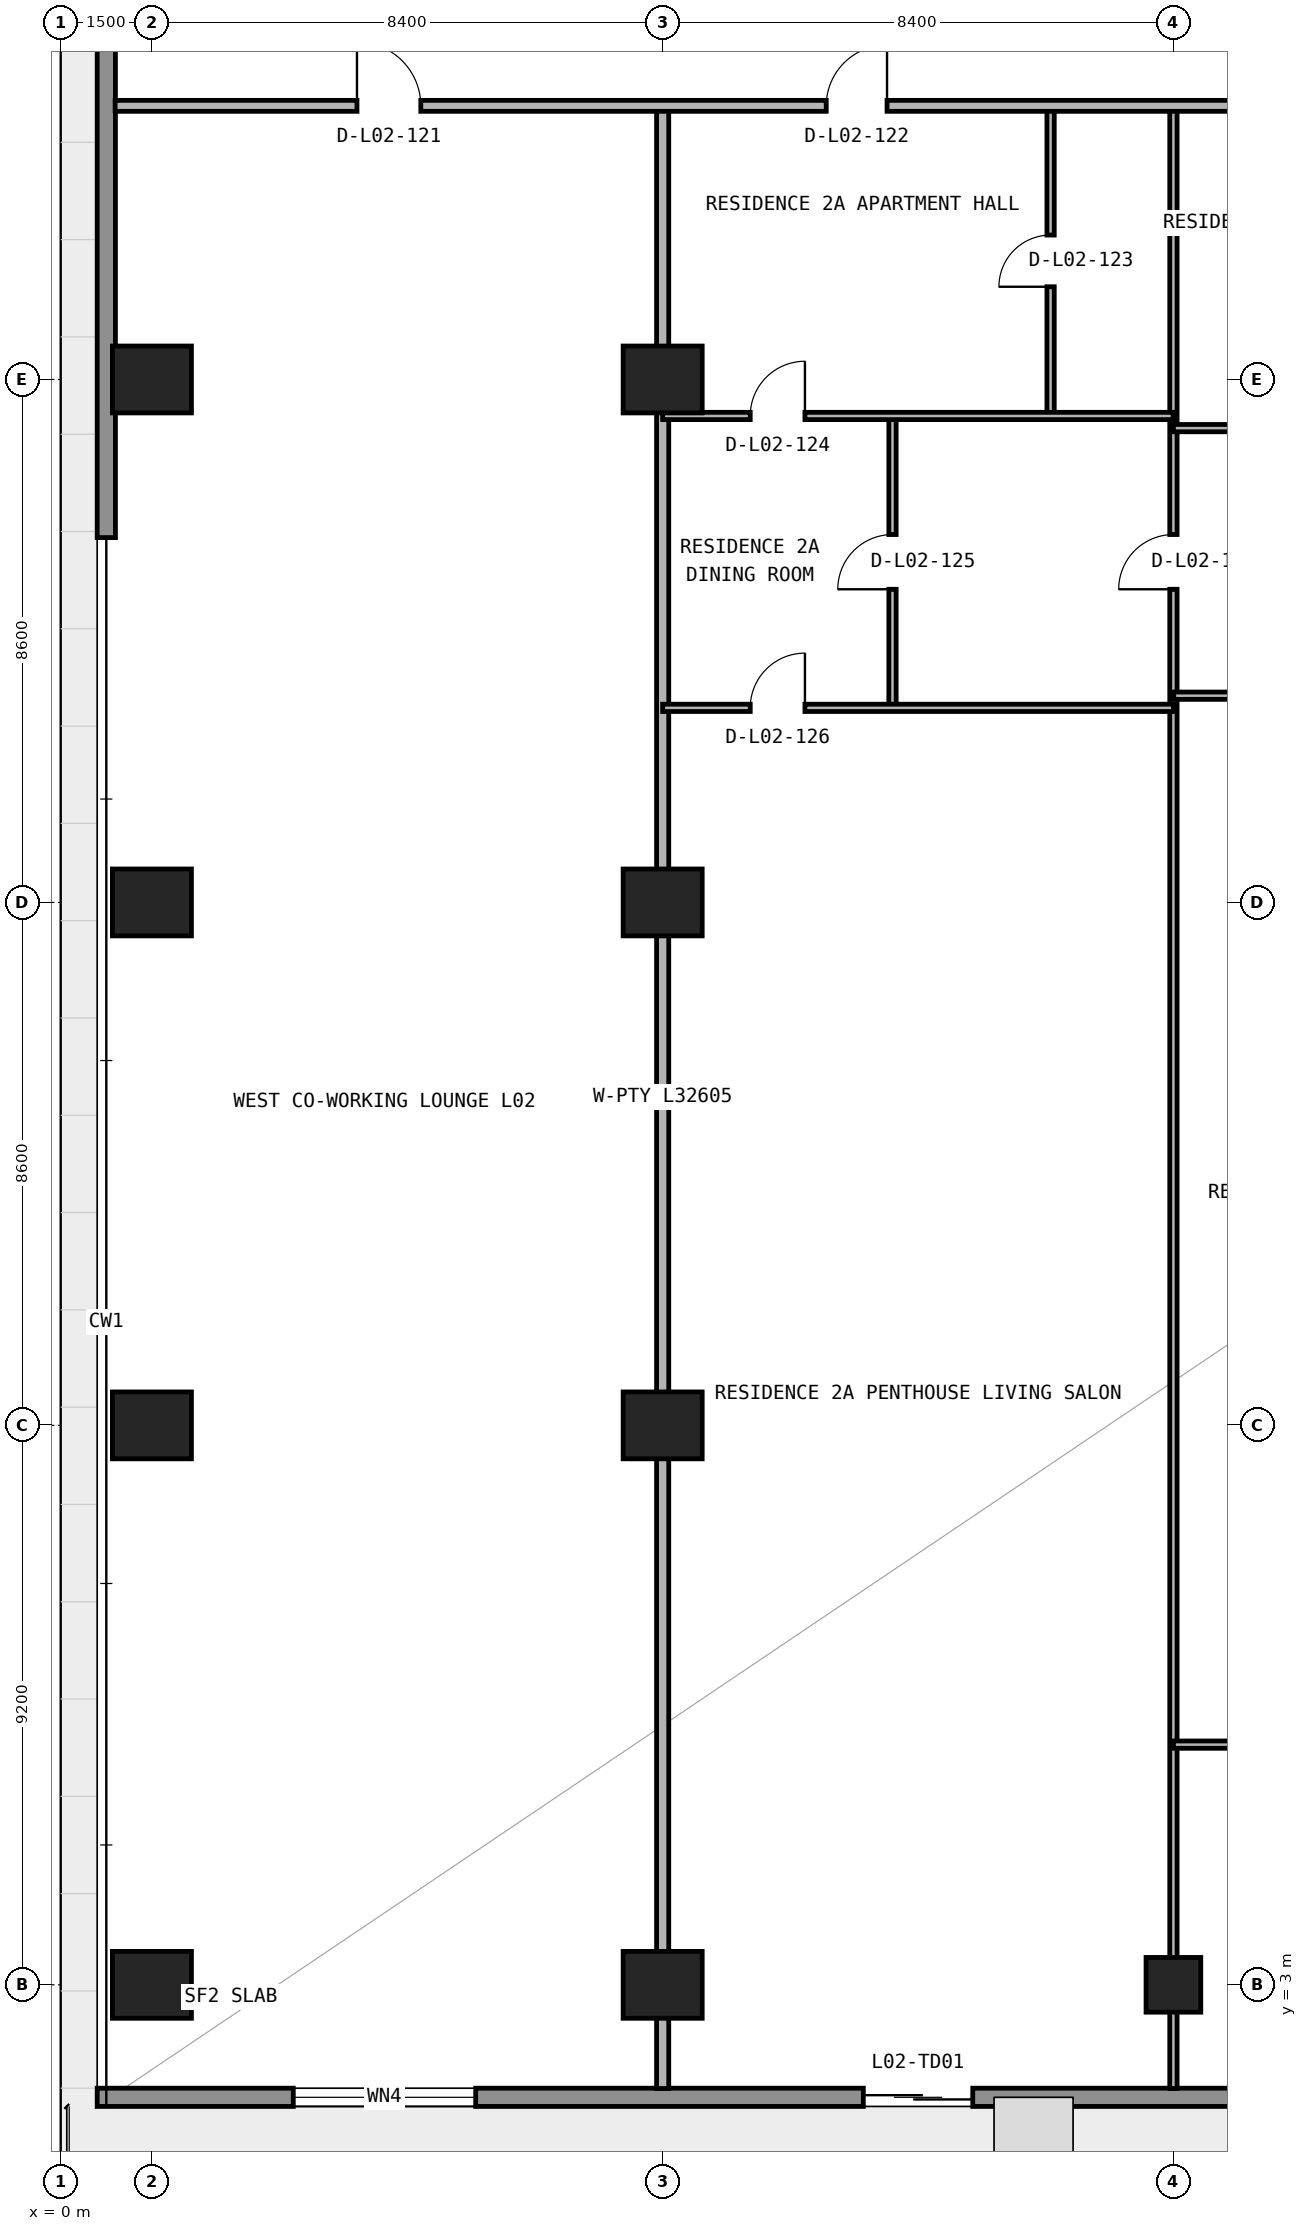
"""IFC4 building model, lengths in metres.
Left out: names, types, materials, properties, quantities, classifications, styles, units other than length and angle.
Written with IfcOpenShell. Run it as: python <this file> out.ifc"""

import sys

from ifc_helpers import new_model, si_unit, direction, frame, frame_2d, origin, origin_2d, place, context, subcontext, project, spatial, rectangle, circle, extrude, element, fill, save


model = new_model("IFC4")
c1 = context("Model", 3, precision=1e-05, world=origin(), true_north=direction((0.0, 1.0)))
c2 = subcontext(c1, "Body", "Model", "MODEL_VIEW")
j1 = project(units=[si_unit("LENGTHUNIT", "METRE"), si_unit("PLANEANGLEUNIT", "RADIAN")], contexts=[c1])
p1 = place(None, origin())
s1 = spatial("IfcSite", under=j1, at=p1, CompositionType="ELEMENT")
p2 = place(p1, origin())
s2 = spatial("IfcBuilding", under=s1, at=p2, CompositionType="ELEMENT")
p3 = place(p2, frame((0.0, 0.0, 10.2)))
s3 = spatial("IfcBuildingStorey", under=s2, at=p3, CompositionType="ELEMENT", Elevation=10.2)
for number, where, z_axis, x_axis in (
    (1, (1.5, 3.0, 0.0), (0.0, 0.0, 1.0), (1.0, 0.0, 0.0)),
    (2, (9.9, 3.0, 0.0), (0.0, 0.0, 1.0), (1.0, 0.0, 0.0)),
):
    element("IfcColumn", number, at=place(p3, frame(where, z_axis=z_axis, x_axis=x_axis)), inside=s3, PredefinedType="COLUMN", context=c2, shape_type="SweptSolid", body=[
        extrude(rectangle(XDim=1.3, YDim=1.1, at=origin_2d()), origin(), (0.0, 0.0, 1.0), 4.5),
    ])
p4 = place(p3, frame((18.3, 3.0, 0.0), z_axis=(0.0, 0.0, 1.0), x_axis=(1.0, 0.0, 0.0)))
e3 = element("IfcColumn", 3, at=p4, inside=s3, PredefinedType="COLUMN", context=c2, shape_type="SweptSolid", body=[
    extrude(circle(Radius=0.45, at=origin_2d()), origin(), (0.0, 0.0, 1.0), 4.5),
])
for number, where, z_axis, x_axis in (
    (4, (1.5, 12.2, 0.0), (0.0, 0.0, 1.0), (1.0, 0.0, 0.0)),
    (5, (9.9, 12.2, 0.0), (0.0, 0.0, 1.0), (1.0, 0.0, 0.0)),
    (6, (1.5, 20.8, 0.0), (0.0, 0.0, 1.0), (1.0, 0.0, 0.0)),
    (7, (9.9, 20.8, 0.0), (0.0, 0.0, 1.0), (1.0, 0.0, 0.0)),
    (8, (1.5, 29.4, 0.0), (0.0, 0.0, 1.0), (1.0, 0.0, 0.0)),
    (9, (9.9, 29.4, 0.0), (0.0, 0.0, 1.0), (1.0, 0.0, 0.0)),
):
    element("IfcColumn", number, at=place(p3, frame(where, z_axis=z_axis, x_axis=x_axis)), inside=s3, PredefinedType="COLUMN", context=c2, shape_type="SweptSolid", body=[
        extrude(rectangle(XDim=1.3, YDim=1.1, at=origin_2d()), origin(), (0.0, 0.0, 1.0), 4.5),
    ])
p5 = place(p3, frame((77.2, 1.15, 0.0), z_axis=(0.0, 0.0, 1.0), x_axis=(-1.0, 0.0, 0.0)))
e10 = element("IfcWall", 10, at=p5, inside=s3, PredefinedType="STANDARD", context=c2, shape_type="SweptSolid", body=[
    extrude(rectangle(XDim=76.6, YDim=0.3, at=frame_2d((38.3, 0.0))), origin(), (0.0, 0.0, 1.0), 4.5),
])
p6 = place(p5, frame((70.375, 0.0, 0.85)))
e11 = element("IfcOpeningElement", 11, at=p6, cuts=e10, PredefinedType="OPENING", context=c2, shape_type="SweptSolid", body=[
    extrude(rectangle(XDim=3.0, YDim=2.4, at=frame_2d((1.5, 1.2))), frame((0.0, 0.16, 0.0), z_axis=(0.0, -1.0, 0.0), x_axis=(1.0, 0.0, 0.0)), (0.0, 0.0, 1.0), 0.32),
])
p7 = place(p5, frame((62.2, 0.0, 0.0)))
e12 = element("IfcOpeningElement", 12, at=p7, cuts=e10, PredefinedType="OPENING", context=c2, shape_type="SweptSolid", body=[
    extrude(rectangle(XDim=1.8, YDim=2.3, at=frame_2d((0.9, 1.15))), frame((0.0, 0.16, 0.0), z_axis=(0.0, -1.0, 0.0), x_axis=(1.0, 0.0, 0.0)), (0.0, 0.0, 1.0), 0.32),
])
p8 = place(p5, frame((53.6, 0.0, 0.85)))
e13 = element("IfcOpeningElement", 13, at=p8, cuts=e10, PredefinedType="OPENING", context=c2, shape_type="SweptSolid", body=[
    extrude(rectangle(XDim=2.2, YDim=1.55, at=frame_2d((1.1, 0.775))), frame((0.0, 0.16, 0.0), z_axis=(0.0, -1.0, 0.0), x_axis=(1.0, 0.0, 0.0)), (0.0, 0.0, 1.0), 0.32),
])
p9 = place(p5, frame((37.4, 0.0, 0.0)))
e14 = element("IfcOpeningElement", 14, at=p9, cuts=e10, PredefinedType="OPENING", context=c2, shape_type="SweptSolid", body=[
    extrude(rectangle(XDim=1.8, YDim=2.3, at=frame_2d((0.9, 1.15))), frame((0.0, 0.16, 0.0), z_axis=(0.0, -1.0, 0.0), x_axis=(1.0, 0.0, 0.0)), (0.0, 0.0, 1.0), 0.32),
])
p10 = place(p5, frame((21.0, 0.0, 0.0)))
e15 = element("IfcOpeningElement", 15, at=p10, cuts=e10, PredefinedType="OPENING", context=c2, shape_type="SweptSolid", body=[
    extrude(rectangle(XDim=1.8, YDim=2.3, at=frame_2d((0.9, 1.15))), frame((0.0, 0.16, 0.0), z_axis=(0.0, -1.0, 0.0), x_axis=(1.0, 0.0, 0.0)), (0.0, 0.0, 1.0), 0.32),
])
p11 = place(p5, frame((12.4, 0.0, 0.85)))
e16 = element("IfcOpeningElement", 16, at=p11, cuts=e10, PredefinedType="OPENING", context=c2, shape_type="SweptSolid", body=[
    extrude(rectangle(XDim=2.2, YDim=1.55, at=frame_2d((1.1, 0.775))), frame((0.0, 0.16, 0.0), z_axis=(0.0, -1.0, 0.0), x_axis=(1.0, 0.0, 0.0)), (0.0, 0.0, 1.0), 0.32),
])
p12 = place(p5, frame((3.825, 0.0, 0.0)))
e17 = element("IfcOpeningElement", 17, at=p12, cuts=e10, PredefinedType="OPENING", context=c2, shape_type="SweptSolid", body=[
    extrude(rectangle(XDim=1.8, YDim=2.3, at=frame_2d((0.9, 1.15))), frame((0.0, 0.16, 0.0), z_axis=(0.0, -1.0, 0.0), x_axis=(1.0, 0.0, 0.0)), (0.0, 0.0, 1.0), 0.32),
])
p13 = place(p3, frame((0.75, 26.8, 0.0), z_axis=(0.0, 0.0, 1.0), x_axis=(0.0, 1.0, 0.0)))
e18 = element("IfcWall", 18, at=p13, inside=s3, PredefinedType="STANDARD", context=c2, shape_type="SweptSolid", body=[
    extrude(rectangle(XDim=25.8, YDim=0.3, at=frame_2d((12.9, 0.0))), origin(), (0.0, 0.0, 1.0), 4.5),
])
p14 = place(p3, frame((9.9, 1.295, 0.0), z_axis=(0.0, 0.0, 1.0), x_axis=(0.0, 1.0, 0.0)))
e19 = element("IfcWall", 19, at=p14, inside=s3, PredefinedType="PARTITIONING", context=c2, shape_type="SweptSolid", body=[
    extrude(rectangle(XDim=32.605, YDim=0.2, at=frame_2d((16.302, 0.0))), origin(), (0.0, 0.0, 1.0), 3.464),
])
p15 = place(p3, frame((13.68, 24.0, 0.0), z_axis=(0.0, 0.0, 1.0), x_axis=(0.0, 1.0, 0.0)))
e20 = element("IfcWall", 20, at=p15, inside=s3, PredefinedType="PARTITIONING", context=c2, shape_type="SweptSolid", body=[
    extrude(rectangle(XDim=4.8, YDim=0.12, at=frame_2d((2.4, 0.0))), origin(), (0.0, 0.0, 1.0), 4.5),
])
p16 = place(p15, frame((1.95, 0.0, 0.0)))
e21 = element("IfcOpeningElement", 21, at=p16, cuts=e20, PredefinedType="OPENING", context=c2, shape_type="SweptSolid", body=[
    extrude(rectangle(XDim=0.9, YDim=2.15, at=frame_2d((0.45, 1.075))), frame((0.0, 0.07, 0.0), z_axis=(0.0, -1.0, 0.0), x_axis=(1.0, 0.0, 0.0)), (0.0, 0.0, 1.0), 0.14),
])
p17 = place(p3, frame((16.28, 28.8, 0.0), z_axis=(0.0, 0.0, 1.0), x_axis=(0.0, 1.0, 0.0)))
e22 = element("IfcWall", 22, at=p17, inside=s3, PredefinedType="PARTITIONING", context=c2, shape_type="SweptSolid", body=[
    extrude(rectangle(XDim=5.1, YDim=0.12, at=frame_2d((2.55, 0.0))), origin(), (0.0, 0.0, 1.0), 4.5),
])
p18 = place(p17, frame((2.125, 0.0, 0.0)))
e23 = element("IfcOpeningElement", 23, at=p18, cuts=e22, PredefinedType="OPENING", context=c2, shape_type="SweptSolid", body=[
    extrude(rectangle(XDim=0.85, YDim=2.1, at=frame_2d((0.425, 1.05))), frame((0.0, 0.07, 0.0), z_axis=(0.0, -1.0, 0.0), x_axis=(1.0, 0.0, 0.0)), (0.0, 0.0, 1.0), 0.14),
])
p19 = place(p3, frame((18.3, 1.295, 0.0), z_axis=(0.0, 0.0, 1.0), x_axis=(0.0, 1.0, 0.0)))
e24 = element("IfcWall", 24, at=p19, inside=s3, PredefinedType="PARTITIONING", context=c2, shape_type="SweptSolid", body=[
    extrude(rectangle(XDim=32.605, YDim=0.12, at=frame_2d((16.302, 0.0))), origin(), (0.0, 0.0, 1.0), 4.5),
])
p20 = place(p19, frame((24.655, 0.0, 0.0)))
e25 = element("IfcOpeningElement", 25, at=p20, cuts=e24, PredefinedType="OPENING", context=c2, shape_type="SweptSolid", body=[
    extrude(rectangle(XDim=0.9, YDim=2.15, at=frame_2d((0.45, 1.075))), frame((0.0, 0.07, 0.0), z_axis=(0.0, -1.0, 0.0), x_axis=(1.0, 0.0, 0.0)), (0.0, 0.0, 1.0), 0.14),
])
p21 = place(p3, frame((18.3, 6.95, 0.0), z_axis=(0.0, 0.0, 1.0), x_axis=(1.0, 0.0, 0.0)))
e26 = element("IfcWall", 26, at=p21, inside=s3, PredefinedType="PARTITIONING", context=c2, shape_type="SweptSolid", body=[
    extrude(rectangle(XDim=8.4, YDim=0.12, at=frame_2d((4.2, 0.0))), origin(), (0.0, 0.0, 1.0), 4.5),
])
p22 = place(p21, frame((3.75, 0.0, 0.0)))
e27 = element("IfcOpeningElement", 27, at=p22, cuts=e26, PredefinedType="OPENING", context=c2, shape_type="SweptSolid", body=[
    extrude(rectangle(XDim=0.9, YDim=2.15, at=frame_2d((0.45, 1.075))), frame((0.0, 0.07, 0.0), z_axis=(0.0, -1.0, 0.0), x_axis=(1.0, 0.0, 0.0)), (0.0, 0.0, 1.0), 0.14),
])
p23 = place(p3, frame((9.9, 24.0, 0.0), z_axis=(0.0, 0.0, 1.0), x_axis=(1.0, 0.0, 0.0)))
e28 = element("IfcWall", 28, at=p23, inside=s3, PredefinedType="PARTITIONING", context=c2, shape_type="SweptSolid", body=[
    extrude(rectangle(XDim=8.4, YDim=0.12, at=frame_2d((4.2, 0.0))), origin(), (0.0, 0.0, 1.0), 4.5),
])
p24 = place(p23, frame((1.44, 0.0, 0.0)))
e29 = element("IfcOpeningElement", 29, at=p24, cuts=e28, PredefinedType="OPENING", context=c2, shape_type="SweptSolid", body=[
    extrude(rectangle(XDim=0.9, YDim=2.15, at=frame_2d((0.45, 1.075))), frame((0.0, 0.07, 0.0), z_axis=(0.0, -1.0, 0.0), x_axis=(1.0, 0.0, 0.0)), (0.0, 0.0, 1.0), 0.14),
])
p25 = place(p3, frame((18.305, 24.2, 0.0), z_axis=(0.0, 0.0, 1.0), x_axis=(1.0, 0.0, 0.0)))
e30 = element("IfcWall", 30, at=p25, inside=s3, PredefinedType="PARTITIONING", context=c2, shape_type="SweptSolid", body=[
    extrude(rectangle(XDim=8.395, YDim=0.12, at=frame_2d((4.198, 0.0))), origin(), (0.0, 0.0, 1.0), 4.5),
])
p26 = place(p25, frame((3.748, 0.0, 0.0)))
e31 = element("IfcOpeningElement", 31, at=p26, cuts=e30, PredefinedType="OPENING", context=c2, shape_type="SweptSolid", body=[
    extrude(rectangle(XDim=0.9, YDim=2.15, at=frame_2d((0.45, 1.075))), frame((0.0, 0.07, 0.0), z_axis=(0.0, -1.0, 0.0), x_axis=(1.0, 0.0, 0.0)), (0.0, 0.0, 1.0), 0.14),
])
p27 = place(p3, frame((18.3, 28.6, 0.0), z_axis=(0.0, 0.0, 1.0), x_axis=(1.0, 0.0, 0.0)))
e32 = element("IfcWall", 32, at=p27, inside=s3, PredefinedType="PARTITIONING", context=c2, shape_type="SweptSolid", body=[
    extrude(rectangle(XDim=8.4, YDim=0.12, at=frame_2d((4.2, 0.0))), origin(), (0.0, 0.0, 1.0), 4.5),
])
p28 = place(p27, frame((2.844, 0.0, 0.0)))
e33 = element("IfcOpeningElement", 33, at=p28, cuts=e32, PredefinedType="OPENING", context=c2, shape_type="SweptSolid", body=[
    extrude(rectangle(XDim=0.9, YDim=2.15, at=frame_2d((0.45, 1.075))), frame((0.0, 0.07, 0.0), z_axis=(0.0, -1.0, 0.0), x_axis=(1.0, 0.0, 0.0)), (0.0, 0.0, 1.0), 0.14),
])
p29 = place(p3, frame((9.9, 28.8, 0.0), z_axis=(0.0, 0.0, 1.0), x_axis=(1.0, 0.0, 0.0)))
e34 = element("IfcWall", 34, at=p29, inside=s3, PredefinedType="PARTITIONING", context=c2, shape_type="SweptSolid", body=[
    extrude(rectangle(XDim=8.395, YDim=0.12, at=frame_2d((4.198, 0.0))), origin(), (0.0, 0.0, 1.0), 4.5),
])
p30 = place(p29, frame((1.44, 0.0, 0.0)))
e35 = element("IfcOpeningElement", 35, at=p30, cuts=e34, PredefinedType="OPENING", context=c2, shape_type="SweptSolid", body=[
    extrude(rectangle(XDim=0.9, YDim=2.15, at=frame_2d((0.45, 1.075))), frame((0.0, 0.07, 0.0), z_axis=(0.0, -1.0, 0.0), x_axis=(1.0, 0.0, 0.0)), (0.0, 0.0, 1.0), 0.14),
])
p31 = place(p3, frame((0.895, 33.9, 0.0), z_axis=(0.0, 0.0, 1.0), x_axis=(1.0, 0.0, 0.0)))
e36 = element("IfcWall", 36, at=p31, inside=s3, PredefinedType="PARTITIONING", context=c2, shape_type="SweptSolid", body=[
    extrude(rectangle(XDim=76.01, YDim=0.18, at=frame_2d((38.005, 0.0))), origin(), (0.0, 0.0, 1.0), 4.5),
])
p32 = place(p31, frame((3.978, 0.0, 0.0)))
e37 = element("IfcOpeningElement", 37, at=p32, cuts=e36, PredefinedType="OPENING", context=c2, shape_type="SweptSolid", body=[
    extrude(rectangle(XDim=1.05, YDim=2.15, at=frame_2d((0.525, 1.075))), frame((0.0, 0.1, 0.0), z_axis=(0.0, -1.0, 0.0), x_axis=(1.0, 0.0, 0.0)), (0.0, 0.0, 1.0), 0.2),
])
p33 = place(p31, frame((11.695, 0.0, 0.0)))
e38 = element("IfcOpeningElement", 38, at=p33, cuts=e36, PredefinedType="OPENING", context=c2, shape_type="SweptSolid", body=[
    extrude(rectangle(XDim=1.0, YDim=2.2, at=frame_2d((0.5, 1.1))), frame((0.0, 0.1, 0.0), z_axis=(0.0, -1.0, 0.0), x_axis=(1.0, 0.0, 0.0)), (0.0, 0.0, 1.0), 0.2),
])
p34 = place(p31, frame((37.48, 0.0, 0.0)))
e39 = element("IfcOpeningElement", 39, at=p34, cuts=e36, PredefinedType="OPENING", context=c2, shape_type="SweptSolid", body=[
    extrude(rectangle(XDim=1.05, YDim=2.15, at=frame_2d((0.525, 1.075))), frame((0.0, 0.1, 0.0), z_axis=(0.0, -1.0, 0.0), x_axis=(1.0, 0.0, 0.0)), (0.0, 0.0, 1.0), 0.2),
])
p35 = place(p31, frame((53.085, 0.0, 0.0)))
e40 = element("IfcOpeningElement", 40, at=p35, cuts=e36, PredefinedType="OPENING", context=c2, shape_type="SweptSolid", body=[
    extrude(rectangle(XDim=1.0, YDim=2.2, at=frame_2d((0.5, 1.1))), frame((0.0, 0.1, 0.0), z_axis=(0.0, -1.0, 0.0), x_axis=(1.0, 0.0, 0.0)), (0.0, 0.0, 1.0), 0.2),
])
p36 = place(p31, frame((70.982, 0.0, 0.0)))
e41 = element("IfcOpeningElement", 41, at=p36, cuts=e36, PredefinedType="OPENING", context=c2, shape_type="SweptSolid", body=[
    extrude(rectangle(XDim=1.05, YDim=2.15, at=frame_2d((0.525, 1.075))), frame((0.0, 0.1, 0.0), z_axis=(0.0, -1.0, 0.0), x_axis=(1.0, 0.0, 0.0)), (0.0, 0.0, 1.0), 0.2),
])
p37 = place(p6, origin())
e42 = element("IfcWindow", 42, at=p37, inside=s3, PartitioningType="SINGLE_PANEL", PredefinedType="WINDOW", context=c2, shape_type="SweptSolid", body=[
    extrude(rectangle(XDim=3.0, YDim=2.4, at=frame_2d((1.5, 1.2))), frame((0.0, 0.03, 0.0), z_axis=(0.0, -1.0, 0.0), x_axis=(1.0, 0.0, 0.0)), (0.0, 0.0, 1.0), 0.06),
])
fill(e11, e42)
p38 = place(p7, origin())
e43 = element("IfcDoor", 43, at=p38, inside=s3, OperationType="DOUBLE_DOOR_SLIDING", PredefinedType="DOOR", context=c2, shape_type="SweptSolid", body=[
    extrude(rectangle(XDim=1.8, YDim=2.3, at=frame_2d((0.9, 1.15))), frame((0.0, 0.025, 0.0), z_axis=(0.0, -1.0, 0.0), x_axis=(1.0, 0.0, 0.0)), (0.0, 0.0, 1.0), 0.05),
])
fill(e12, e43)
p39 = place(p32, origin())
e44 = element("IfcDoor", 44, at=p39, inside=s3, OperationType="SINGLE_SWING_LEFT", PredefinedType="DOOR", context=c2, shape_type="SweptSolid", body=[
    extrude(rectangle(XDim=1.05, YDim=2.15, at=frame_2d((0.525, 1.075))), frame((0.0, 0.025, 0.0), z_axis=(0.0, -1.0, 0.0), x_axis=(1.0, 0.0, 0.0)), (0.0, 0.0, 1.0), 0.05),
])
fill(e37, e44)
p40 = place(p33, origin())
e45 = element("IfcDoor", 45, at=p40, inside=s3, OperationType="SINGLE_SWING_RIGHT", PredefinedType="DOOR", context=c2, shape_type="SweptSolid", body=[
    extrude(rectangle(XDim=1.0, YDim=2.2, at=frame_2d((0.5, 1.1))), frame((0.0, 0.025, 0.0), z_axis=(0.0, -1.0, 0.0), x_axis=(1.0, 0.0, 0.0)), (0.0, 0.0, 1.0), 0.05),
])
fill(e38, e45)
p41 = place(p18, origin())
e46 = element("IfcDoor", 46, at=p41, inside=s3, OperationType="SINGLE_SWING_LEFT", PredefinedType="DOOR", context=c2, shape_type="SweptSolid", body=[
    extrude(rectangle(XDim=0.85, YDim=2.1, at=frame_2d((0.425, 1.05))), frame((0.0, 0.025, 0.0), z_axis=(0.0, -1.0, 0.0), x_axis=(1.0, 0.0, 0.0)), (0.0, 0.0, 1.0), 0.05),
])
fill(e23, e46)
p42 = place(p30, origin())
e47 = element("IfcDoor", 47, at=p42, inside=s3, OperationType="SINGLE_SWING_RIGHT", PredefinedType="DOOR", context=c2, shape_type="SweptSolid", body=[
    extrude(rectangle(XDim=0.9, YDim=2.15, at=frame_2d((0.45, 1.075))), frame((0.0, 0.025, 0.0), z_axis=(0.0, -1.0, 0.0), x_axis=(1.0, 0.0, 0.0)), (0.0, 0.0, 1.0), 0.05),
])
fill(e35, e47)
p43 = place(p16, origin())
e48 = element("IfcDoor", 48, at=p43, inside=s3, OperationType="SINGLE_SWING_LEFT", PredefinedType="DOOR", context=c2, shape_type="SweptSolid", body=[
    extrude(rectangle(XDim=0.9, YDim=2.15, at=frame_2d((0.45, 1.075))), frame((0.0, 0.025, 0.0), z_axis=(0.0, -1.0, 0.0), x_axis=(1.0, 0.0, 0.0)), (0.0, 0.0, 1.0), 0.05),
])
fill(e21, e48)
p44 = place(p24, origin())
e49 = element("IfcDoor", 49, at=p44, inside=s3, OperationType="SINGLE_SWING_RIGHT", PredefinedType="DOOR", context=c2, shape_type="SweptSolid", body=[
    extrude(rectangle(XDim=0.9, YDim=2.15, at=frame_2d((0.45, 1.075))), frame((0.0, 0.025, 0.0), z_axis=(0.0, -1.0, 0.0), x_axis=(1.0, 0.0, 0.0)), (0.0, 0.0, 1.0), 0.05),
])
fill(e29, e49)
p45 = place(p20, origin())
e50 = element("IfcDoor", 50, at=p45, inside=s3, OperationType="SINGLE_SWING_LEFT", PredefinedType="DOOR", context=c2, shape_type="SweptSolid", body=[
    extrude(rectangle(XDim=0.9, YDim=2.15, at=frame_2d((0.45, 1.075))), frame((0.0, 0.025, 0.0), z_axis=(0.0, -1.0, 0.0), x_axis=(1.0, 0.0, 0.0)), (0.0, 0.0, 1.0), 0.05),
])
fill(e25, e50)
save(model, sys.argv[1])
